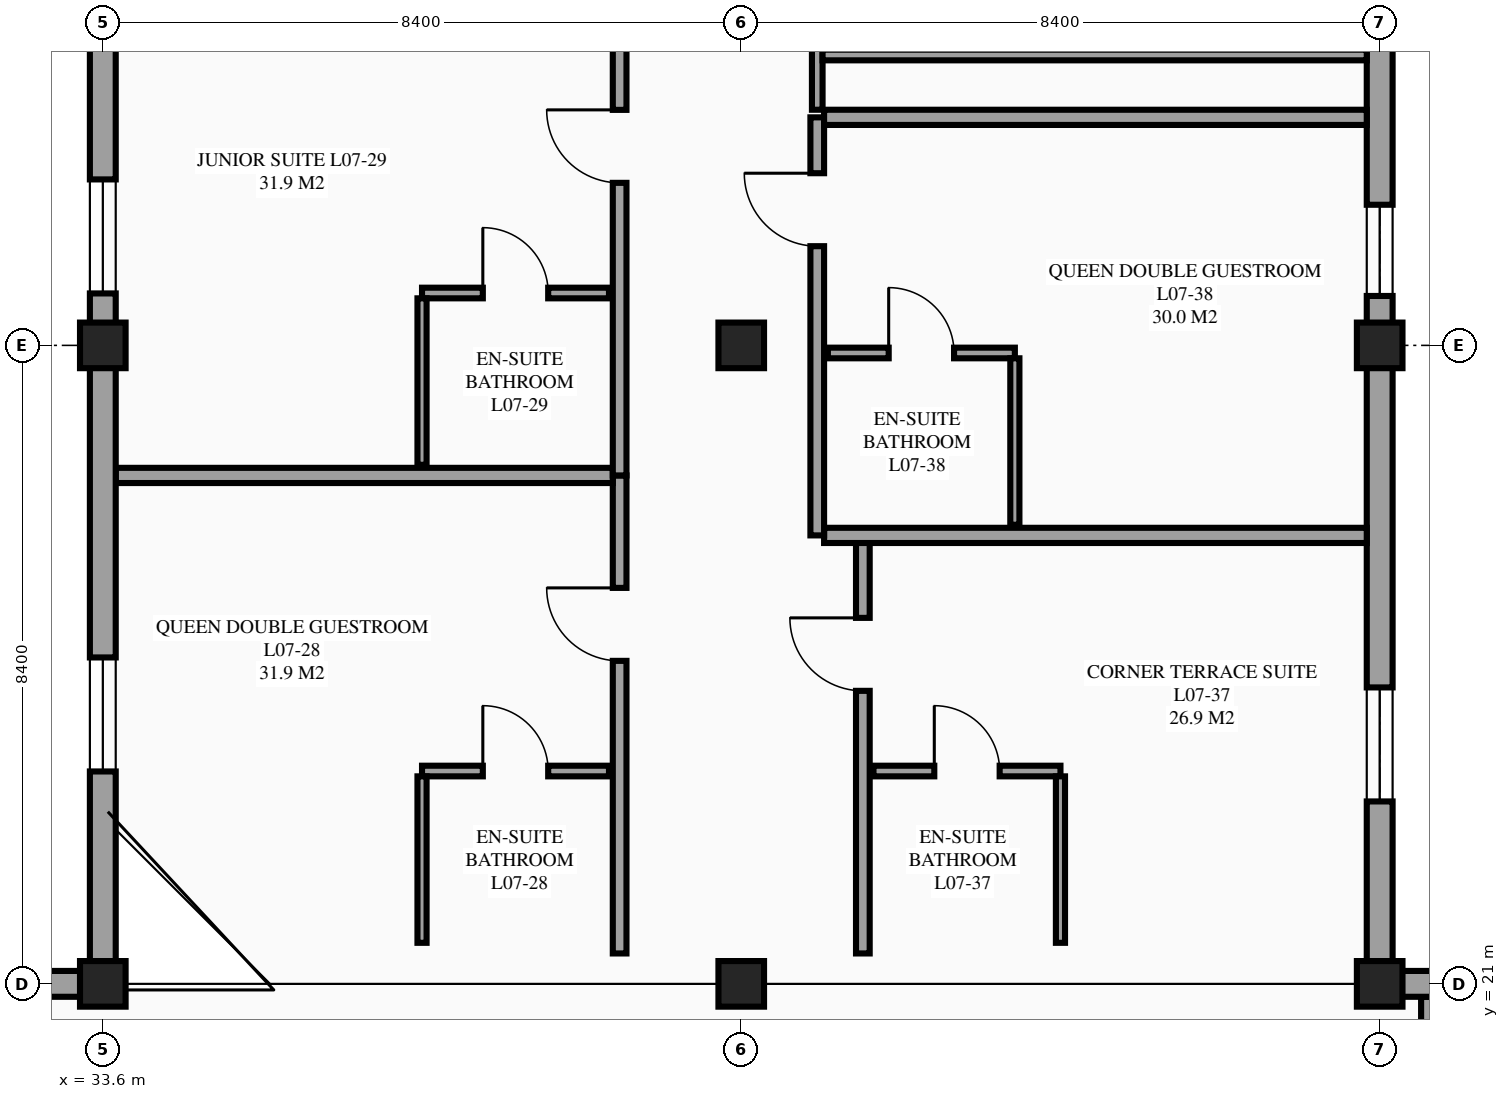
"""IFC4 building model, lengths in metres.
Left out: names, types, materials, properties, quantities, classifications, styles, units other than length and angle.
Written with IfcOpenShell. Run it as: python <this file> out.ifc"""

import sys

from ifc_helpers import new_model, si_unit, direction, frame, frame_2d, origin, origin_2d, place, context, subcontext, project, spatial, rectangle, extrude, element, fill, save


model = new_model("IFC4")
c1 = context("Model", 3, precision=1e-05, world=origin(), true_north=direction((0.0, 1.0)))
c2 = subcontext(c1, "Body", "Model", "MODEL_VIEW")
j1 = project(units=[si_unit("LENGTHUNIT", "METRE"), si_unit("PLANEANGLEUNIT", "RADIAN")], contexts=[c1])
p1 = place(None, origin())
s1 = spatial("IfcSite", under=j1, at=p1, CompositionType="ELEMENT")
p2 = place(p1, origin())
s2 = spatial("IfcBuilding", under=s1, at=p2, CompositionType="ELEMENT")
p3 = place(p2, frame((0.0, 0.0, 29.1)))
s3 = spatial("IfcBuildingStorey", under=s2, at=p3, CompositionType="ELEMENT", Elevation=29.1)
for number, where, z_axis, x_axis in (
    (1, (33.6, 21.0, 0.0), (0.0, 0.0, 1.0), (1.0, 0.0, 0.0)),
    (2, (33.6, 29.4, 0.0), (0.0, 0.0, 1.0), (1.0, 0.0, 0.0)),
    (3, (42.0, 21.0, 0.0), (0.0, 0.0, 1.0), (1.0, 0.0, 0.0)),
    (4, (42.0, 29.4, 0.0), (0.0, 0.0, 1.0), (1.0, 0.0, 0.0)),
    (5, (50.4, 21.0, 0.0), (0.0, 0.0, 1.0), (1.0, 0.0, 0.0)),
    (6, (50.4, 29.4, 0.0), (0.0, 0.0, 1.0), (1.0, 0.0, 0.0)),
):
    element("IfcColumn", number, at=place(p3, frame(where, z_axis=z_axis, x_axis=x_axis)), inside=s3, PredefinedType="COLUMN", context=c2, shape_type="SweptSolid", body=[
        extrude(rectangle(XDim=0.6, YDim=0.6, at=origin_2d()), origin(), (0.0, 0.0, 1.0), 3.6),
    ])
p4 = place(p3, frame((50.4, 21.0, 0.0), z_axis=(0.0, 0.0, 1.0), x_axis=(0.0, 1.0, 0.0)))
e7 = element("IfcWall", 7, at=p4, inside=s3, PredefinedType="STANDARD", context=c2, shape_type="SweptSolid", body=[
    extrude(rectangle(XDim=16.8, YDim=0.34, at=frame_2d((8.4, 0.0))), origin(), (0.0, 0.0, 1.0), 2.68),
])
p5 = place(p4, frame((2.4, 0.0, 0.85)))
e8 = element("IfcOpeningElement", 8, at=p5, cuts=e7, PredefinedType="OPENING", context=c2, shape_type="SweptSolid", body=[
    extrude(rectangle(XDim=1.5, YDim=1.5, at=frame_2d((0.75, 0.75))), frame((0.0, 0.18, 0.0), z_axis=(0.0, -1.0, 0.0), x_axis=(1.0, 0.0, 0.0)), (0.0, 0.0, 1.0), 0.36),
])
p6 = place(p4, frame((9.05, 0.0, 0.85)))
e9 = element("IfcOpeningElement", 9, at=p6, cuts=e7, PredefinedType="OPENING", context=c2, shape_type="SweptSolid", body=[
    extrude(rectangle(XDim=1.2, YDim=1.5, at=frame_2d((0.6, 0.75))), frame((0.0, 0.18, 0.0), z_axis=(0.0, -1.0, 0.0), x_axis=(1.0, 0.0, 0.0)), (0.0, 0.0, 1.0), 0.36),
])
p7 = place(p3, frame((33.6, 54.6, 0.0), z_axis=(0.0, 0.0, 1.0), x_axis=(0.0, -1.0, 0.0)))
e10 = element("IfcWall", 10, at=p7, inside=s3, PredefinedType="STANDARD", context=c2, shape_type="SweptSolid", body=[
    extrude(rectangle(XDim=25.2, YDim=0.34, at=frame_2d((12.6, 0.0))), origin(), (0.0, 0.0, 1.0), 2.48),
])
p8 = place(p7, frame((23.017, 0.0, 0.85)))
e11 = element("IfcOpeningElement", 11, at=p8, cuts=e10, PredefinedType="OPENING", context=c2, shape_type="SweptSolid", body=[
    extrude(rectangle(XDim=1.5, YDim=1.5, at=frame_2d((0.75, 0.75))), frame((0.0, 0.18, 0.0), z_axis=(0.0, -1.0, 0.0), x_axis=(1.0, 0.0, 0.0)), (0.0, 0.0, 1.0), 0.36),
])
p9 = place(p7, frame((17.478, 0.0, 0.85)))
e12 = element("IfcOpeningElement", 12, at=p9, cuts=e10, PredefinedType="OPENING", context=c2, shape_type="SweptSolid", body=[
    extrude(rectangle(XDim=1.5, YDim=1.5, at=frame_2d((0.75, 0.75))), frame((0.0, 0.18, 0.0), z_axis=(0.0, -1.0, 0.0), x_axis=(1.0, 0.0, 0.0)), (0.0, 0.0, 1.0), 0.36),
])
p10 = place(p7, frame((10.439, 0.0, 0.85)))
e13 = element("IfcOpeningElement", 13, at=p10, cuts=e10, PredefinedType="OPENING", context=c2, shape_type="SweptSolid", body=[
    extrude(rectangle(XDim=1.5, YDim=1.5, at=frame_2d((0.75, 0.75))), frame((0.0, 0.18, 0.0), z_axis=(0.0, -1.0, 0.0), x_axis=(1.0, 0.0, 0.0)), (0.0, 0.0, 1.0), 0.36),
])
p11 = place(p7, frame((4.15, 0.0, 0.85)))
e14 = element("IfcOpeningElement", 14, at=p11, cuts=e10, PredefinedType="OPENING", context=c2, shape_type="SweptSolid", body=[
    extrude(rectangle(XDim=1.5, YDim=1.5, at=frame_2d((0.75, 0.75))), frame((0.0, 0.18, 0.0), z_axis=(0.0, -1.0, 0.0), x_axis=(1.0, 0.0, 0.0)), (0.0, 0.0, 1.0), 0.36),
])
p12 = place(p3, frame((33.6, 21.0, 0.0), z_axis=(0.0, 0.0, 1.0), x_axis=(-1.0, 0.0, 0.0)))
e15 = element("IfcWall", 15, at=p12, inside=s3, PredefinedType="STANDARD", context=c2, shape_type="SweptSolid", body=[
    extrude(rectangle(XDim=2.0, YDim=0.34, at=frame_2d((1.0, 0.0))), origin(), (0.0, 0.0, 1.0), 2.88),
])
p13 = place(p3, frame((40.4, 21.4, 0.0), z_axis=(0.0, 0.0, 1.0), x_axis=(0.0, 1.0, 0.0)))
e16 = element("IfcWall", 16, at=p13, inside=s3, PredefinedType="PARTITIONING", context=c2, shape_type="SweptSolid", body=[
    extrude(rectangle(XDim=6.289, YDim=0.18, at=frame_2d((3.145, 0.0))), origin(), (0.0, 0.0, 1.0), 3.375),
])
p14 = place(p13, frame((3.849, 0.0, 0.0)))
e17 = element("IfcOpeningElement", 17, at=p14, cuts=e16, PredefinedType="OPENING", context=c2, shape_type="SweptSolid", body=[
    extrude(rectangle(XDim=0.96, YDim=2.15, at=frame_2d((0.48, 1.075))), frame((0.0, 0.1, 0.0), z_axis=(0.0, -1.0, 0.0), x_axis=(1.0, 0.0, 0.0)), (0.0, 0.0, 1.0), 0.2),
])
p15 = place(p3, frame((33.77, 27.689, 0.0), z_axis=(0.0, 0.0, 1.0), x_axis=(1.0, 0.0, 0.0)))
e18 = element("IfcWall", 18, at=p15, inside=s3, PredefinedType="PARTITIONING", context=c2, shape_type="SweptSolid", body=[
    extrude(rectangle(XDim=6.54, YDim=0.2, at=frame_2d((3.27, 0.0))), origin(), (0.0, 0.0, 1.0), 3.375),
])
p16 = place(p3, frame((37.8, 23.8, 0.0), z_axis=(0.0, 0.0, 1.0), x_axis=(1.0, 0.0, 0.0)))
e19 = element("IfcWall", 19, at=p16, inside=s3, PredefinedType="PARTITIONING", context=c2, shape_type="SweptSolid", body=[
    extrude(rectangle(XDim=2.46, YDim=0.14, at=frame_2d((1.23, 0.0))), origin(), (0.0, 0.0, 1.0), 3.375),
])
p17 = place(p16, frame((0.8, 0.0, 0.0)))
e20 = element("IfcOpeningElement", 20, at=p17, cuts=e19, PredefinedType="OPENING", context=c2, shape_type="SweptSolid", body=[
    extrude(rectangle(XDim=0.86, YDim=2.1, at=frame_2d((0.43, 1.05))), frame((0.0, 0.08, 0.0), z_axis=(0.0, -1.0, 0.0), x_axis=(1.0, 0.0, 0.0)), (0.0, 0.0, 1.0), 0.16),
])
p18 = place(p3, frame((37.8, 21.54, 0.0), z_axis=(0.0, 0.0, 1.0), x_axis=(0.0, 1.0, 0.0)))
e21 = element("IfcWall", 21, at=p18, inside=s3, PredefinedType="PARTITIONING", context=c2, shape_type="SweptSolid", body=[
    extrude(rectangle(XDim=2.19, YDim=0.12, at=frame_2d((1.095, 0.0))), origin(), (0.0, 0.0, 1.0), 3.375),
])
p19 = place(p3, frame((40.4, 27.689, 0.0), z_axis=(0.0, 0.0, 1.0), x_axis=(0.0, 1.0, 0.0)))
e22 = element("IfcWall", 22, at=p19, inside=s3, PredefinedType="PARTITIONING", context=c2, shape_type="SweptSolid", body=[
    extrude(rectangle(XDim=6.289, YDim=0.18, at=frame_2d((3.145, 0.0))), origin(), (0.0, 0.0, 1.0), 3.375),
])
p20 = place(p19, frame((3.849, 0.0, 0.0)))
e23 = element("IfcOpeningElement", 23, at=p20, cuts=e22, PredefinedType="OPENING", context=c2, shape_type="SweptSolid", body=[
    extrude(rectangle(XDim=0.96, YDim=2.15, at=frame_2d((0.48, 1.075))), frame((0.0, 0.1, 0.0), z_axis=(0.0, -1.0, 0.0), x_axis=(1.0, 0.0, 0.0)), (0.0, 0.0, 1.0), 0.2),
])
p21 = place(p3, frame((37.8, 30.089, 0.0), z_axis=(0.0, 0.0, 1.0), x_axis=(1.0, 0.0, 0.0)))
e24 = element("IfcWall", 24, at=p21, inside=s3, PredefinedType="PARTITIONING", context=c2, shape_type="SweptSolid", body=[
    extrude(rectangle(XDim=2.46, YDim=0.14, at=frame_2d((1.23, 0.0))), origin(), (0.0, 0.0, 1.0), 3.375),
])
p22 = place(p21, frame((0.8, 0.0, 0.0)))
e25 = element("IfcOpeningElement", 25, at=p22, cuts=e24, PredefinedType="OPENING", context=c2, shape_type="SweptSolid", body=[
    extrude(rectangle(XDim=0.86, YDim=2.1, at=frame_2d((0.43, 1.05))), frame((0.0, 0.08, 0.0), z_axis=(0.0, -1.0, 0.0), x_axis=(1.0, 0.0, 0.0)), (0.0, 0.0, 1.0), 0.16),
])
p23 = place(p3, frame((37.8, 27.829, 0.0), z_axis=(0.0, 0.0, 1.0), x_axis=(0.0, 1.0, 0.0)))
e26 = element("IfcWall", 26, at=p23, inside=s3, PredefinedType="PARTITIONING", context=c2, shape_type="SweptSolid", body=[
    extrude(rectangle(XDim=2.19, YDim=0.12, at=frame_2d((1.095, 0.0))), origin(), (0.0, 0.0, 1.0), 3.375),
])
p24 = place(p3, frame((43.6, 21.4, 0.0), z_axis=(0.0, 0.0, 1.0), x_axis=(0.0, 1.0, 0.0)))
e27 = element("IfcWall", 27, at=p24, inside=s3, PredefinedType="PARTITIONING", context=c2, shape_type="SweptSolid", body=[
    extrude(rectangle(XDim=5.5, YDim=0.18, at=frame_2d((2.75, 0.0))), origin(), (0.0, 0.0, 1.0), 3.375),
])
p25 = place(p24, frame((3.455, 0.0, 0.0)))
e28 = element("IfcOpeningElement", 28, at=p25, cuts=e27, PredefinedType="OPENING", context=c2, shape_type="SweptSolid", body=[
    extrude(rectangle(XDim=0.96, YDim=2.15, at=frame_2d((0.48, 1.075))), frame((0.0, 0.1, 0.0), z_axis=(0.0, -1.0, 0.0), x_axis=(1.0, 0.0, 0.0)), (0.0, 0.0, 1.0), 0.2),
])
p26 = place(p3, frame((43.09, 26.9, 0.0), z_axis=(0.0, 0.0, 1.0), x_axis=(1.0, 0.0, 0.0)))
e29 = element("IfcWall", 29, at=p26, inside=s3, PredefinedType="PARTITIONING", context=c2, shape_type="SweptSolid", body=[
    extrude(rectangle(XDim=7.14, YDim=0.2, at=frame_2d((3.57, 0.0))), origin(), (0.0, 0.0, 1.0), 3.375),
])
p27 = place(p3, frame((43.74, 23.8, 0.0), z_axis=(0.0, 0.0, 1.0), x_axis=(1.0, 0.0, 0.0)))
e30 = element("IfcWall", 30, at=p27, inside=s3, PredefinedType="PARTITIONING", context=c2, shape_type="SweptSolid", body=[
    extrude(rectangle(XDim=2.46, YDim=0.14, at=frame_2d((1.23, 0.0))), origin(), (0.0, 0.0, 1.0), 3.375),
])
p28 = place(p27, frame((0.8, 0.0, 0.0)))
e31 = element("IfcOpeningElement", 31, at=p28, cuts=e30, PredefinedType="OPENING", context=c2, shape_type="SweptSolid", body=[
    extrude(rectangle(XDim=0.86, YDim=2.1, at=frame_2d((0.43, 1.05))), frame((0.0, 0.08, 0.0), z_axis=(0.0, -1.0, 0.0), x_axis=(1.0, 0.0, 0.0)), (0.0, 0.0, 1.0), 0.16),
])
p29 = place(p3, frame((46.2, 21.54, 0.0), z_axis=(0.0, 0.0, 1.0), x_axis=(0.0, 1.0, 0.0)))
e32 = element("IfcWall", 32, at=p29, inside=s3, PredefinedType="PARTITIONING", context=c2, shape_type="SweptSolid", body=[
    extrude(rectangle(XDim=2.19, YDim=0.12, at=frame_2d((1.095, 0.0))), origin(), (0.0, 0.0, 1.0), 3.375),
])
p30 = place(p3, frame((43.0, 26.9, 0.0), z_axis=(0.0, 0.0, 1.0), x_axis=(0.0, 1.0, 0.0)))
e33 = element("IfcWall", 33, at=p30, inside=s3, PredefinedType="PARTITIONING", context=c2, shape_type="SweptSolid", body=[
    extrude(rectangle(XDim=5.5, YDim=0.18, at=frame_2d((2.75, 0.0))), origin(), (0.0, 0.0, 1.0), 3.375),
])
p31 = place(p30, frame((3.805, 0.0, 0.0)))
e34 = element("IfcOpeningElement", 34, at=p31, cuts=e33, PredefinedType="OPENING", context=c2, shape_type="SweptSolid", body=[
    extrude(rectangle(XDim=0.96, YDim=2.15, at=frame_2d((0.48, 1.075))), frame((0.0, 0.1, 0.0), z_axis=(0.0, -1.0, 0.0), x_axis=(1.0, 0.0, 0.0)), (0.0, 0.0, 1.0), 0.2),
])
p32 = place(p3, frame((43.09, 32.4, 0.0), z_axis=(0.0, 0.0, 1.0), x_axis=(1.0, 0.0, 0.0)))
e35 = element("IfcWall", 35, at=p32, inside=s3, PredefinedType="PARTITIONING", context=c2, shape_type="SweptSolid", body=[
    extrude(rectangle(XDim=7.14, YDim=0.2, at=frame_2d((3.57, 0.0))), origin(), (0.0, 0.0, 1.0), 3.375),
])
p33 = place(p3, frame((43.14, 29.3, 0.0), z_axis=(0.0, 0.0, 1.0), x_axis=(1.0, 0.0, 0.0)))
e36 = element("IfcWall", 36, at=p33, inside=s3, PredefinedType="PARTITIONING", context=c2, shape_type="SweptSolid", body=[
    extrude(rectangle(XDim=2.46, YDim=0.14, at=frame_2d((1.23, 0.0))), origin(), (0.0, 0.0, 1.0), 2.53),
])
p34 = place(p33, frame((0.8, 0.0, 0.0)))
e37 = element("IfcOpeningElement", 37, at=p34, cuts=e36, PredefinedType="OPENING", context=c2, shape_type="SweptSolid", body=[
    extrude(rectangle(XDim=0.86, YDim=2.1, at=frame_2d((0.43, 1.05))), frame((0.0, 0.08, 0.0), z_axis=(0.0, -1.0, 0.0), x_axis=(1.0, 0.0, 0.0)), (0.0, 0.0, 1.0), 0.16),
])
p35 = place(p3, frame((45.6, 27.04, 0.0), z_axis=(0.0, 0.0, 1.0), x_axis=(0.0, 1.0, 0.0)))
e38 = element("IfcWall", 38, at=p35, inside=s3, PredefinedType="PARTITIONING", context=c2, shape_type="SweptSolid", body=[
    extrude(rectangle(XDim=2.19, YDim=0.12, at=frame_2d((1.095, 0.0))), origin(), (0.0, 0.0, 1.0), 3.375),
])
p36 = place(p3, frame((51.02, 14.695, 0.0), z_axis=(0.0, 0.0, 1.0), x_axis=(0.0, 1.0, 0.0)))
e39 = element("IfcWall", 39, at=p36, inside=s3, PredefinedType="PARTITIONING", context=c2, shape_type="SweptSolid", body=[
    extrude(rectangle(XDim=6.135, YDim=0.15, at=frame_2d((3.067, 0.0))), origin(), (0.0, 0.0, 1.0), 3.375),
])
p37 = place(p3, frame((43.0, 32.5, 0.0), z_axis=(0.0, 0.0, 1.0), x_axis=(0.0, 1.0, 0.0)))
e40 = element("IfcWall", 40, at=p37, inside=s3, PredefinedType="PARTITIONING", context=c2, shape_type="SweptSolid", body=[
    extrude(rectangle(XDim=4.8, YDim=0.14, at=frame_2d((2.4, 0.0))), origin(), (0.0, 0.0, 1.0), 3.375),
])
p38 = place(p37, frame((2.05, 0.0, 0.0)))
e41 = element("IfcOpeningElement", 41, at=p38, cuts=e40, PredefinedType="OPENING", context=c2, shape_type="SweptSolid", body=[
    extrude(rectangle(XDim=0.9, YDim=2.12, at=frame_2d((0.45, 1.06))), frame((0.0, 0.08, 0.0), z_axis=(0.0, -1.0, 0.0), x_axis=(1.0, 0.0, 0.0)), (0.0, 0.0, 1.0), 0.16),
])
p39 = place(p3, frame((43.07, 33.22, 0.0), z_axis=(0.0, 0.0, 1.0), x_axis=(1.0, 0.0, 0.0)))
e42 = element("IfcWall", 42, at=p39, inside=s3, PredefinedType="PARTITIONING", context=c2, shape_type="SweptSolid", body=[
    extrude(rectangle(XDim=7.16, YDim=0.14, at=frame_2d((3.58, 0.0))), origin(), (0.0, 0.0, 1.0), 3.375),
])
p40 = place(p3, frame((58.8, 21.0, 0.0), z_axis=(0.0, 0.0, 1.0), x_axis=(-1.0, 0.0, 0.0)))
e43 = element("IfcWall", 43, at=p40, inside=s3, PredefinedType="STANDARD", context=c2, shape_type="SweptSolid", body=[
    extrude(rectangle(XDim=8.4, YDim=0.34, at=frame_2d((4.2, 0.0))), origin(), (0.0, 0.0, 1.0), 3.075),
])
p41 = place(p40, frame((3.3, 0.0, 0.75)))
e44 = element("IfcOpeningElement", 44, at=p41, cuts=e43, PredefinedType="OPENING", context=c2, shape_type="SweptSolid", body=[
    extrude(rectangle(XDim=1.8, YDim=1.5, at=frame_2d((0.9, 0.75))), frame((0.0, 0.18, 0.0), z_axis=(0.0, -1.0, 0.0), x_axis=(1.0, 0.0, 0.0)), (0.0, 0.0, 1.0), 0.36),
])
p42 = place(p3, frame((33.6, 29.4, 0.0), z_axis=(0.0, 0.0, 1.0), x_axis=(0.0, -1.0, 0.0)))
e45 = element("IfcWall", 45, at=p42, inside=s3, PredefinedType="STANDARD", context=c2, shape_type="SweptSolid", body=[
    extrude(rectangle(XDim=8.4, YDim=0.34, at=frame_2d((4.2, 0.0))), origin(), (0.0, 0.0, 1.0), 2.88),
])
p43 = place(p42, frame((4.106, 0.0, 0.85)))
e46 = element("IfcOpeningElement", 46, at=p43, cuts=e45, PredefinedType="OPENING", context=c2, shape_type="SweptSolid", body=[
    extrude(rectangle(XDim=1.5, YDim=1.5, at=frame_2d((0.75, 0.75))), frame((0.0, 0.18, 0.0), z_axis=(0.0, -1.0, 0.0), x_axis=(1.0, 0.0, 0.0)), (0.0, 0.0, 1.0), 0.36),
])
p44 = place(p43, origin())
e47 = element("IfcWindow", 47, at=p44, inside=s3, PartitioningType="SINGLE_PANEL", PredefinedType="WINDOW", context=c2, shape_type="SweptSolid", body=[
    extrude(rectangle(XDim=1.5, YDim=1.5, at=frame_2d((0.75, 0.75))), frame((0.0, 0.03, 0.0), z_axis=(0.0, -1.0, 0.0), x_axis=(1.0, 0.0, 0.0)), (0.0, 0.0, 1.0), 0.06),
])
fill(e46, e47)
p45 = place(p8, origin())
e48 = element("IfcWindow", 48, at=p45, inside=s3, PartitioningType="SINGLE_PANEL", PredefinedType="WINDOW", context=c2, shape_type="SweptSolid", body=[
    extrude(rectangle(XDim=1.5, YDim=1.5, at=frame_2d((0.75, 0.75))), frame((0.0, 0.03, 0.0), z_axis=(0.0, -1.0, 0.0), x_axis=(1.0, 0.0, 0.0)), (0.0, 0.0, 1.0), 0.06),
])
fill(e11, e48)
p46 = place(p5, origin())
e49 = element("IfcWindow", 49, at=p46, inside=s3, PartitioningType="SINGLE_PANEL", PredefinedType="WINDOW", context=c2, shape_type="SweptSolid", body=[
    extrude(rectangle(XDim=1.5, YDim=1.5, at=frame_2d((0.75, 0.75))), frame((0.0, 0.03, 0.0), z_axis=(0.0, -1.0, 0.0), x_axis=(1.0, 0.0, 0.0)), (0.0, 0.0, 1.0), 0.06),
])
fill(e8, e49)
p47 = place(p6, origin())
e50 = element("IfcWindow", 50, at=p47, inside=s3, PartitioningType="SINGLE_PANEL", PredefinedType="WINDOW", context=c2, shape_type="SweptSolid", body=[
    extrude(rectangle(XDim=1.2, YDim=1.5, at=frame_2d((0.6, 0.75))), frame((0.0, 0.03, 0.0), z_axis=(0.0, -1.0, 0.0), x_axis=(1.0, 0.0, 0.0)), (0.0, 0.0, 1.0), 0.06),
])
fill(e9, e50)
p48 = place(p14, origin())
e51 = element("IfcDoor", 51, at=p48, inside=s3, OperationType="SINGLE_SWING_RIGHT", PredefinedType="DOOR", context=c2, shape_type="SweptSolid", body=[
    extrude(rectangle(XDim=0.96, YDim=2.15, at=frame_2d((0.48, 1.075))), frame((0.0, 0.025, 0.0), z_axis=(0.0, -1.0, 0.0), x_axis=(1.0, 0.0, 0.0)), (0.0, 0.0, 1.0), 0.05),
])
fill(e17, e51)
p49 = place(p17, origin())
e52 = element("IfcDoor", 52, at=p49, inside=s3, OperationType="SINGLE_SWING_LEFT", PredefinedType="DOOR", context=c2, shape_type="SweptSolid", body=[
    extrude(rectangle(XDim=0.86, YDim=2.1, at=frame_2d((0.43, 1.05))), frame((0.0, 0.025, 0.0), z_axis=(0.0, -1.0, 0.0), x_axis=(1.0, 0.0, 0.0)), (0.0, 0.0, 1.0), 0.05),
])
fill(e20, e52)
p50 = place(p20, origin())
e53 = element("IfcDoor", 53, at=p50, inside=s3, OperationType="SINGLE_SWING_RIGHT", PredefinedType="DOOR", context=c2, shape_type="SweptSolid", body=[
    extrude(rectangle(XDim=0.96, YDim=2.15, at=frame_2d((0.48, 1.075))), frame((0.0, 0.025, 0.0), z_axis=(0.0, -1.0, 0.0), x_axis=(1.0, 0.0, 0.0)), (0.0, 0.0, 1.0), 0.05),
])
fill(e23, e53)
p51 = place(p22, origin())
e54 = element("IfcDoor", 54, at=p51, inside=s3, OperationType="SINGLE_SWING_LEFT", PredefinedType="DOOR", context=c2, shape_type="SweptSolid", body=[
    extrude(rectangle(XDim=0.86, YDim=2.1, at=frame_2d((0.43, 1.05))), frame((0.0, 0.025, 0.0), z_axis=(0.0, -1.0, 0.0), x_axis=(1.0, 0.0, 0.0)), (0.0, 0.0, 1.0), 0.05),
])
fill(e25, e54)
p52 = place(p25, origin())
e55 = element("IfcDoor", 55, at=p52, inside=s3, OperationType="SINGLE_SWING_RIGHT", PredefinedType="DOOR", context=c2, shape_type="SweptSolid", body=[
    extrude(rectangle(XDim=0.96, YDim=2.15, at=frame_2d((0.48, 1.075))), frame((0.0, 0.025, 0.0), z_axis=(0.0, -1.0, 0.0), x_axis=(1.0, 0.0, 0.0)), (0.0, 0.0, 1.0), 0.05),
])
fill(e28, e55)
p53 = place(p28, origin())
e56 = element("IfcDoor", 56, at=p53, inside=s3, OperationType="SINGLE_SWING_LEFT", PredefinedType="DOOR", context=c2, shape_type="SweptSolid", body=[
    extrude(rectangle(XDim=0.86, YDim=2.1, at=frame_2d((0.43, 1.05))), frame((0.0, 0.025, 0.0), z_axis=(0.0, -1.0, 0.0), x_axis=(1.0, 0.0, 0.0)), (0.0, 0.0, 1.0), 0.05),
])
fill(e31, e56)
p54 = place(p31, origin())
e57 = element("IfcDoor", 57, at=p54, inside=s3, OperationType="SINGLE_SWING_RIGHT", PredefinedType="DOOR", context=c2, shape_type="SweptSolid", body=[
    extrude(rectangle(XDim=0.96, YDim=2.15, at=frame_2d((0.48, 1.075))), frame((0.0, 0.025, 0.0), z_axis=(0.0, -1.0, 0.0), x_axis=(1.0, 0.0, 0.0)), (0.0, 0.0, 1.0), 0.05),
])
fill(e34, e57)
p55 = place(p34, origin())
e58 = element("IfcDoor", 58, at=p55, inside=s3, OperationType="SINGLE_SWING_LEFT", PredefinedType="DOOR", context=c2, shape_type="SweptSolid", body=[
    extrude(rectangle(XDim=0.86, YDim=2.1, at=frame_2d((0.43, 1.05))), frame((0.0, 0.025, 0.0), z_axis=(0.0, -1.0, 0.0), x_axis=(1.0, 0.0, 0.0)), (0.0, 0.0, 1.0), 0.05),
])
fill(e37, e58)
save(model, sys.argv[1])
